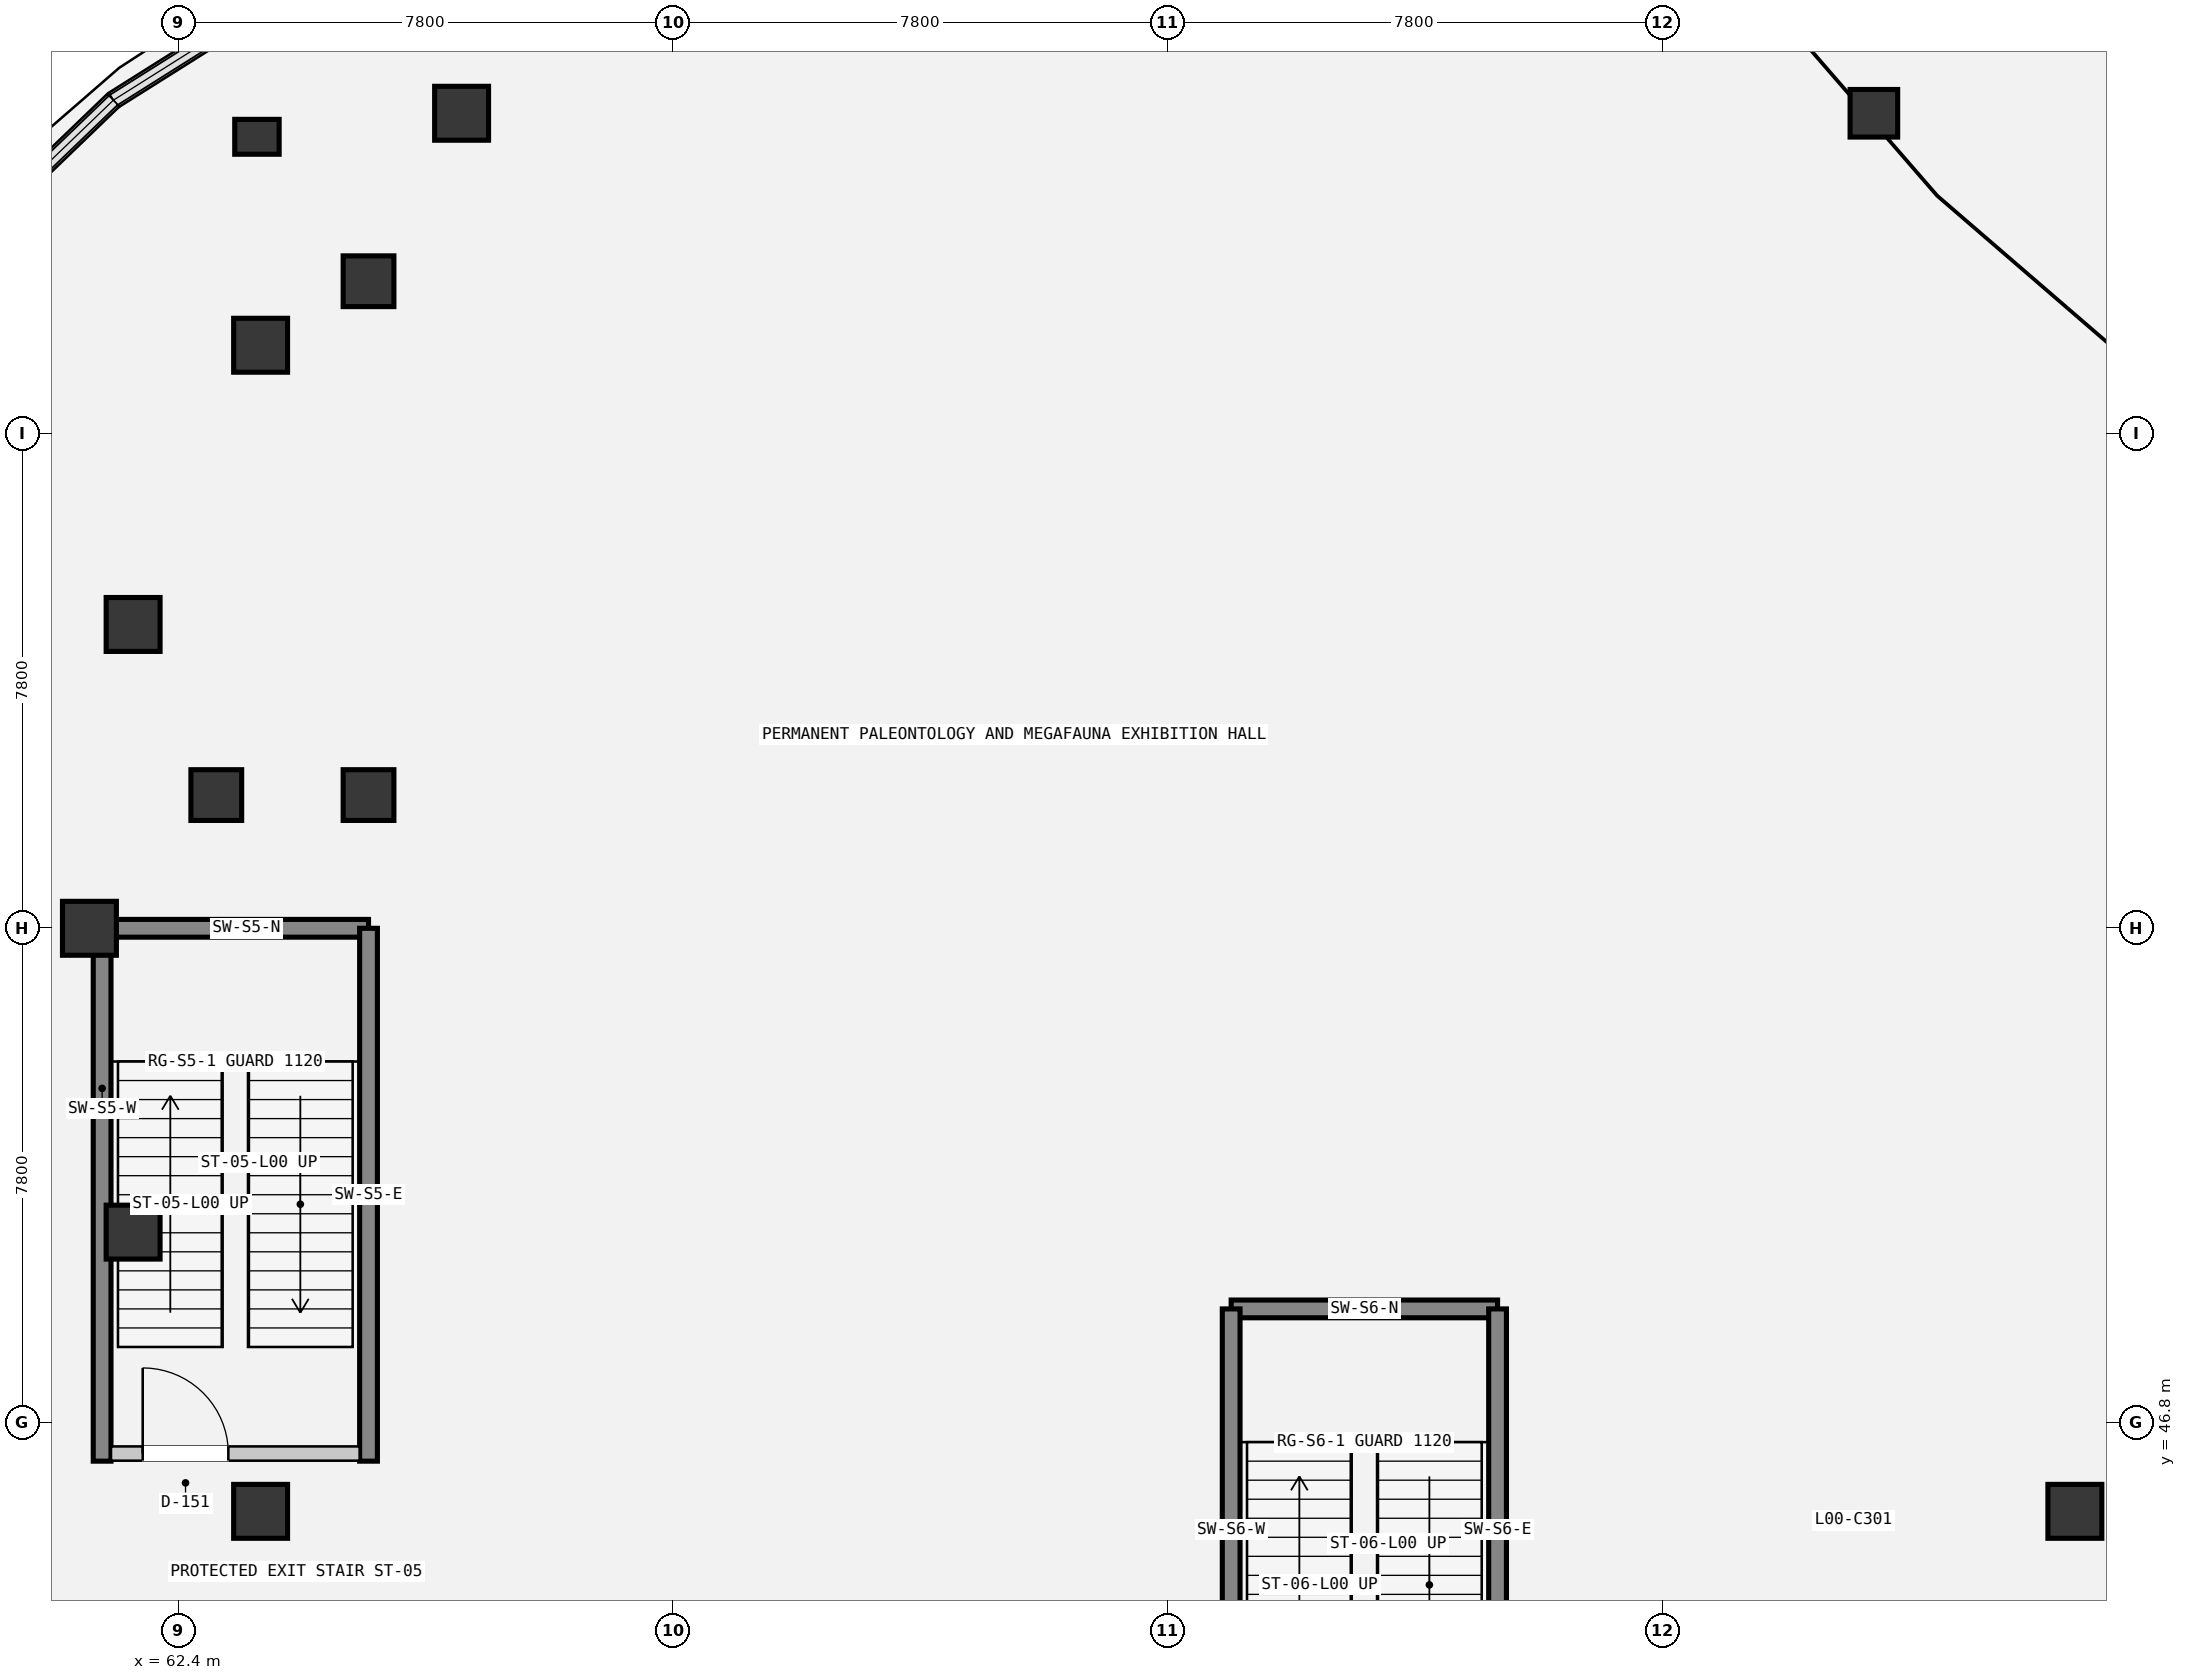
"""IFC4 building model, lengths in metres.
Left out: names, types, materials, properties, quantities, classifications, styles, units other than length and angle.
Written with IfcOpenShell. Run it as: python <this file> out.ifc"""

import sys

from ifc_helpers import new_model, si_unit, direction, frame, frame_2d, origin, origin_2d, place, context, subcontext, project, spatial, rectangle, circle, extrude, element, fill, save


model = new_model("IFC4")
c1 = context("Model", 3, precision=1e-05, world=origin(), true_north=direction((0.0, 1.0)))
c2 = subcontext(c1, "Body", "Model", "MODEL_VIEW")
j1 = project(units=[si_unit("LENGTHUNIT", "METRE"), si_unit("PLANEANGLEUNIT", "RADIAN")], contexts=[c1])
p1 = place(None, origin())
s1 = spatial("IfcSite", under=j1, at=p1, CompositionType="ELEMENT")
p2 = place(p1, origin())
s2 = spatial("IfcBuilding", under=s1, at=p2, CompositionType="ELEMENT")
p3 = place(p2, origin())
s3 = spatial("IfcBuildingStorey", under=s2, at=p3, CompositionType="ELEMENT", Elevation=0.0)
p4 = place(p3, frame((89.133, 67.448, 0.0), z_axis=(0.0, 0.0, 1.0), x_axis=(1.0, 0.0, 0.0)))
e1 = element("IfcColumn", 1, at=p4, inside=s3, PredefinedType="COLUMN", context=c2, shape_type="SweptSolid", body=[
    extrude(circle(Radius=0.375, at=origin_2d()), origin(), (0.0, 0.0, 1.0), 5.4),
])
for number, where, z_axis, x_axis in (
    (2, (66.867, 67.448, 0.0), (0.0, 0.0, 1.0), (1.0, 0.0, 0.0)),
    (3, (63.699, 63.791, 0.0), (0.0, 0.0, 1.0), (1.0, 0.0, 0.0)),
    (4, (61.689, 59.389, 0.0), (0.0, 0.0, 1.0), (1.0, 0.0, 0.0)),
    (5, (61.0, 54.6, 0.0), (0.0, 0.0, 1.0), (1.0, 0.0, 0.0)),
    (6, (61.689, 49.811, 0.0), (0.0, 0.0, 1.0), (1.0, 0.0, 0.0)),
    (7, (63.699, 45.409, 0.0), (0.0, 0.0, 1.0), (1.0, 0.0, 0.0)),
    (8, (92.301, 45.409, 0.0), (0.0, 0.0, 1.0), (1.0, 0.0, 0.0)),
):
    element("IfcColumn", number, at=place(p3, frame(where, z_axis=z_axis, x_axis=x_axis)), inside=s3, PredefinedType="COLUMN", context=c2, shape_type="SweptSolid", body=[
        extrude(circle(Radius=0.425, at=origin_2d()), origin(), (0.0, 0.0, 1.0), 5.4),
    ])
p5 = place(p3, frame((63.641, 67.077, 0.0), z_axis=(0.0, 0.0, 1.0), x_axis=(1.0, 0.0, 0.0)))
e9 = element("IfcColumn", 9, at=p5, inside=s3, PredefinedType="COLUMN", context=c2, shape_type="SweptSolid", body=[
    extrude(rectangle(XDim=0.7, YDim=0.55, at=origin_2d()), origin(), (0.0, 0.0, 1.0), 5.4),
])
for number, where, z_axis, x_axis in (
    (10, (63.0, 56.7, 0.0), (0.0, 0.0, 1.0), (1.0, 0.0, 0.0)),
    (11, (65.4, 56.7, 0.0), (0.0, 0.0, 1.0), (1.0, 0.0, 0.0)),
    (12, (65.4, 64.8, 0.0), (0.0, 0.0, 1.0), (1.0, 0.0, 0.0)),
):
    element("IfcColumn", number, at=place(p3, frame(where, z_axis=z_axis, x_axis=x_axis)), inside=s3, PredefinedType="COLUMN", context=c2, shape_type="SweptSolid", body=[
        extrude(rectangle(XDim=0.8, YDim=0.8, at=origin_2d()), origin(), (0.0, 0.0, 1.0), 5.4),
    ])
p6 = place(p3, frame((61.2, 54.6, 0.0), z_axis=(0.0, 0.0, 1.0), x_axis=(1.0, 0.0, 0.0)))
e13 = element("IfcWall", 13, at=p6, inside=s3, PredefinedType="SHEAR", context=c2, shape_type="SweptSolid", body=[
    extrude(rectangle(XDim=4.2, YDim=0.28, at=frame_2d((2.1, 0.0))), origin(), (0.0, 0.0, 1.0), 5.4),
])
for number, where, z_axis, x_axis in (
    (14, (61.2, 46.2, 0.0), (0.0, 0.0, 1.0), (0.0, 1.0, 0.0)),
    (15, (65.4, 46.2, 0.0), (0.0, 0.0, 1.0), (0.0, 1.0, 0.0)),
):
    element("IfcWall", number, at=place(p3, frame(where, z_axis=z_axis, x_axis=x_axis)), inside=s3, PredefinedType="SHEAR", context=c2, shape_type="SweptSolid", body=[
        extrude(rectangle(XDim=8.4, YDim=0.28, at=frame_2d((4.2, 0.0))), origin(), (0.0, 0.0, 1.0), 5.4),
    ])
p7 = place(p3, frame((79.0, 48.6, 0.0), z_axis=(0.0, 0.0, 1.0), x_axis=(1.0, 0.0, 0.0)))
e16 = element("IfcWall", 16, at=p7, inside=s3, PredefinedType="SHEAR", context=c2, shape_type="SweptSolid", body=[
    extrude(rectangle(XDim=4.2, YDim=0.28, at=frame_2d((2.1, 0.0))), origin(), (0.0, 0.0, 1.0), 5.4),
])
for number, where, z_axis, x_axis in (
    (17, (79.0, 40.2, 0.0), (0.0, 0.0, 1.0), (0.0, 1.0, 0.0)),
    (18, (83.2, 40.2, 0.0), (0.0, 0.0, 1.0), (0.0, 1.0, 0.0)),
):
    element("IfcWall", number, at=place(p3, frame(where, z_axis=z_axis, x_axis=x_axis)), inside=s3, PredefinedType="SHEAR", context=c2, shape_type="SweptSolid", body=[
        extrude(rectangle(XDim=8.4, YDim=0.28, at=frame_2d((4.2, 0.0))), origin(), (0.0, 0.0, 1.0), 5.4),
    ])
p8 = place(p3, frame((65.175, 70.044, 0.0), z_axis=(0.0, 0.0, 1.0), x_axis=(-0.846321881283, -0.532671825106, 0.0)))
e19 = element("IfcWall", 19, at=p8, inside=s3, PredefinedType="SOLIDWALL", context=c2, shape_type="SweptSolid", body=[
    extrude(rectangle(XDim=4.487, YDim=0.275, at=frame_2d((2.243, 0.0))), origin(), (0.0, 0.0, 1.0), 1.02),
])
p9 = place(p3, frame((61.378, 67.654, 0.0), z_axis=(0.0, 0.0, 1.0), x_axis=(-0.720560669205, -0.693391896402, 0.0)))
e20 = element("IfcWall", 20, at=p9, inside=s3, PredefinedType="SOLIDWALL", context=c2, shape_type="SweptSolid", body=[
    extrude(rectangle(XDim=4.358, YDim=0.275, at=frame_2d((2.179, 0.0))), origin(), (0.0, 0.0, 1.0), 1.02),
])
p10 = place(p3, frame((61.34, 46.32, 0.0), z_axis=(0.0, 0.0, 1.0), x_axis=(1.0, 0.0, 0.0)))
e21 = element("IfcWall", 21, at=p10, inside=s3, PredefinedType="PARTITIONING", context=c2, shape_type="SweptSolid", body=[
    extrude(rectangle(XDim=3.92, YDim=0.225, at=frame_2d((1.96, 0.0))), origin(), (0.0, 0.0, 1.0), 4.11),
])
p11 = place(p10, frame((0.5, 0.0, 0.0)))
e22 = element("IfcOpeningElement", 22, at=p11, cuts=e21, PredefinedType="OPENING", context=c2, shape_type="SweptSolid", body=[
    extrude(rectangle(XDim=1.35, YDim=2.2, at=frame_2d((0.675, 1.1))), frame((0.0, 0.123, 0.0), z_axis=(0.0, -1.0, 0.0), x_axis=(1.0, 0.0, 0.0)), (0.0, 0.0, 1.0), 0.245),
])
p12 = place(p11, origin())
e23 = element("IfcDoor", 23, at=p12, inside=s3, OperationType="SINGLE_SWING_LEFT", PredefinedType="DOOR", context=c2, shape_type="SweptSolid", body=[
    extrude(rectangle(XDim=1.35, YDim=2.2, at=frame_2d((0.675, 1.1))), frame((0.0, 0.025, 0.0), z_axis=(0.0, -1.0, 0.0), x_axis=(1.0, 0.0, 0.0)), (0.0, 0.0, 1.0), 0.05),
])
fill(e22, e23)
save(model, sys.argv[1])
